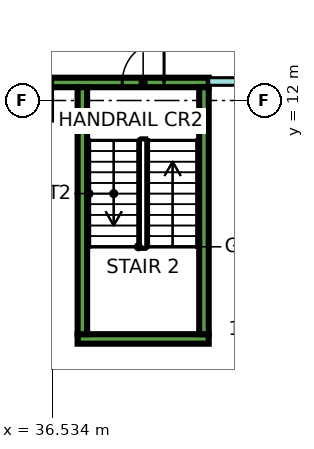
"""IFC4 building model, lengths in metres.
Left out: names, types, materials, properties, quantities, classifications, styles, units other than length and angle.
Written with IfcOpenShell. Run it as: python <this file> out.ifc"""

import sys

from ifc_helpers import new_model, si_unit, direction, frame, frame_2d, origin, place, context, subcontext, project, spatial, rectangle, extrude, element, fill, save


model = new_model("IFC4")
c1 = context("Model", 3, precision=1e-05, world=origin(), true_north=direction((0.0, 1.0)))
c2 = subcontext(c1, "Body", "Model", "MODEL_VIEW")
j1 = project(units=[si_unit("LENGTHUNIT", "METRE"), si_unit("PLANEANGLEUNIT", "RADIAN")], contexts=[c1])
p1 = place(None, origin())
s1 = spatial("IfcSite", under=j1, at=p1, CompositionType="ELEMENT")
p2 = place(p1, origin())
s2 = spatial("IfcBuilding", under=s1, at=p2, CompositionType="ELEMENT")
p3 = place(p2, frame((0.0, 0.0, 136.9)))
s3 = spatial("IfcBuildingStorey", under=s2, at=p3, CompositionType="ELEMENT", Elevation=136.9)
p4 = place(p3, frame((37.2, 5.725, 0.0), z_axis=(0.0, 0.0, 1.0), x_axis=(1.0, 0.0, 0.0)))
e1 = element("IfcWall", 1, at=p4, inside=s3, PredefinedType="SHEAR", context=c2, shape_type="SweptSolid", body=[
    extrude(rectangle(XDim=3.45, YDim=0.25, at=frame_2d((1.725, 0.0))), origin(), (0.0, 0.0, 1.0), 3.75),
])
p5 = place(p3, frame((36.5, 12.475, 0.0), z_axis=(0.0, 0.0, 1.0), x_axis=(1.0, 0.0, 0.0)))
e2 = element("IfcWall", 2, at=p5, inside=s3, PredefinedType="SHEAR", context=c2, shape_type="SweptSolid", body=[
    extrude(rectangle(XDim=4.15, YDim=0.25, at=frame_2d((2.075, 0.0))), origin(), (0.0, 0.0, 1.0), 3.75),
])
p6 = place(p5, frame((1.875, 0.0, 0.0)))
e3 = element("IfcOpeningElement", 3, at=p6, cuts=e2, PredefinedType="OPENING", context=c2, shape_type="SweptSolid", body=[
    extrude(rectangle(XDim=1.1, YDim=2.2, at=frame_2d((0.55, 1.1))), frame((0.0, 0.135, 0.0), z_axis=(0.0, -1.0, 0.0), x_axis=(1.0, 0.0, 0.0)), (0.0, 0.0, 1.0), 0.27),
])
for number, where, z_axis, x_axis in (
    (4, (37.325, 5.85, 0.0), (0.0, 0.0, 1.0), (0.0, 1.0, 0.0)),
    (5, (40.525, 5.85, 0.0), (0.0, 0.0, 1.0), (0.0, 1.0, 0.0)),
):
    element("IfcWall", number, at=place(p3, frame(where, z_axis=z_axis, x_axis=x_axis)), inside=s3, PredefinedType="SHEAR", context=c2, shape_type="SweptSolid", body=[
        extrude(rectangle(XDim=6.5, YDim=0.25, at=frame_2d((3.25, 0.0))), origin(), (0.0, 0.0, 1.0), 3.75),
    ])
p7 = place(p3, frame((40.65, 12.5, 0.0), z_axis=(0.0, 0.0, 1.0), x_axis=(1.0, 0.0, 0.0)))
e6 = element("IfcWall", 6, at=p7, inside=s3, PredefinedType="PARTITIONING", context=c2, shape_type="SweptSolid", body=[
    extrude(rectangle(XDim=31.276, YDim=0.2, at=frame_2d((15.638, 0.0))), origin(), (0.0, 0.0, 1.0), 3.3),
])
p8 = place(p7, frame((29.1, 0.0, 0.0)))
e7 = element("IfcOpeningElement", 7, at=p8, cuts=e6, PredefinedType="OPENING", context=c2, shape_type="SweptSolid", body=[
    extrude(rectangle(XDim=1.0, YDim=2.1, at=frame_2d((0.5, 1.05))), frame((0.0, 0.11, 0.0), z_axis=(0.0, -1.0, 0.0), x_axis=(1.0, 0.0, 0.0)), (0.0, 0.0, 1.0), 0.22),
])
p9 = place(p7, frame((1.05, 0.0, 0.0)))
e8 = element("IfcOpeningElement", 8, at=p9, cuts=e6, PredefinedType="OPENING", context=c2, shape_type="SweptSolid", body=[
    extrude(rectangle(XDim=1.0, YDim=2.1, at=frame_2d((0.5, 1.05))), frame((0.0, 0.11, 0.0), z_axis=(0.0, -1.0, 0.0), x_axis=(1.0, 0.0, 0.0)), (0.0, 0.0, 1.0), 0.22),
])
p10 = place(p6, frame((1.1, 0.0, 0.0), z_axis=(0.0, 0.0, 1.0), x_axis=(-1.0, 0.0, 0.0)))
e9 = element("IfcDoor", 9, at=p10, inside=s3, OperationType="SINGLE_SWING_RIGHT", PredefinedType="DOOR", context=c2, shape_type="SweptSolid", body=[
    extrude(rectangle(XDim=1.1, YDim=2.2, at=frame_2d((0.55, 1.1))), frame((0.0, 0.025, 0.0), z_axis=(0.0, -1.0, 0.0), x_axis=(1.0, 0.0, 0.0)), (0.0, 0.0, 1.0), 0.05),
])
fill(e3, e9)
save(model, sys.argv[1])
